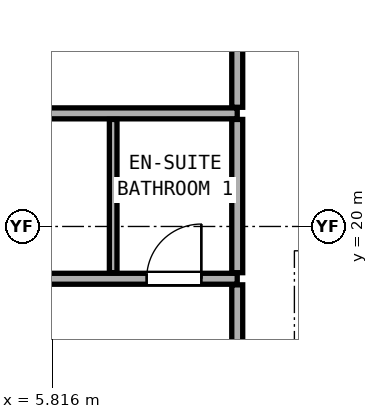
"""IFC4 building model, lengths in metres.
Left out: names, types, materials, properties, quantities, classifications, styles, units other than length and angle.
Written with IfcOpenShell. Run it as: python <this file> out.ifc"""

import sys

from ifc_helpers import new_model, si_unit, direction, frame, frame_2d, origin, place, context, subcontext, project, spatial, rectangle, extrude, element, fill, save


model = new_model("IFC4")
c1 = context("Model", 3, precision=1e-05, world=origin(), true_north=direction((0.0, 1.0)))
c2 = subcontext(c1, "Body", "Model", "MODEL_VIEW")
j1 = project(units=[si_unit("LENGTHUNIT", "METRE"), si_unit("PLANEANGLEUNIT", "RADIAN")], contexts=[c1])
p1 = place(None, origin())
s1 = spatial("IfcSite", under=j1, at=p1, CompositionType="ELEMENT")
p2 = place(p1, origin())
s2 = spatial("IfcBuilding", under=s1, at=p2, CompositionType="ELEMENT")
p3 = place(p2, frame((0.0, 0.0, 48.8)))
s3 = spatial("IfcBuildingStorey", under=s2, at=p3, CompositionType="ELEMENT", Elevation=48.8)
p4 = place(p3, frame((-2.72, 19.14, 0.0), z_axis=(0.0, 0.0, 1.0), x_axis=(1.0, 0.0, 0.0)))
e1 = element("IfcWall", 1, at=p4, inside=s3, PredefinedType="PARTITIONING", context=c2, shape_type="SweptSolid", body=[
    extrude(rectangle(XDim=11.58, YDim=0.18, at=frame_2d((5.79, 0.0))), origin(), (0.0, 0.0, 1.0), 2.125),
])
p5 = place(p4, frame((3.015, 0.0, 0.0)))
e2 = element("IfcOpeningElement", 2, at=p5, cuts=e1, PredefinedType="OPENING", context=c2, shape_type="SweptSolid", body=[
    extrude(rectangle(XDim=0.85, YDim=2.01, at=frame_2d((0.425, 1.005))), frame((0.0, 0.1, 0.0), z_axis=(0.0, -1.0, 0.0), x_axis=(1.0, 0.0, 0.0)), (0.0, 0.0, 1.0), 0.2),
])
p6 = place(p4, frame((10.09, 0.0, 0.0)))
e3 = element("IfcOpeningElement", 3, at=p6, cuts=e1, PredefinedType="OPENING", context=c2, shape_type="SweptSolid", body=[
    extrude(rectangle(XDim=0.9, YDim=2.1, at=frame_2d((0.45, 1.05))), frame((0.0, 0.1, 0.0), z_axis=(0.0, -1.0, 0.0), x_axis=(1.0, 0.0, 0.0)), (0.0, 0.0, 1.0), 0.2),
])
p7 = place(p3, frame((-2.72, 21.86, 0.0), z_axis=(0.0, 0.0, 1.0), x_axis=(1.0, 0.0, 0.0)))
e4 = element("IfcWall", 4, at=p7, inside=s3, PredefinedType="PARTITIONING", context=c2, shape_type="SweptSolid", body=[
    extrude(rectangle(XDim=11.58, YDim=0.18, at=frame_2d((5.79, 0.0))), origin(), (0.0, 0.0, 1.0), 2.125),
])
p8 = place(p3, frame((6.82, 19.24, 0.0), z_axis=(0.0, 0.0, 1.0), x_axis=(0.0, 1.0, 0.0)))
e5 = element("IfcWall", 5, at=p8, inside=s3, PredefinedType="PARTITIONING", context=c2, shape_type="SweptSolid", body=[
    extrude(rectangle(XDim=2.52, YDim=0.125, at=frame_2d((1.26, 0.0))), origin(), (0.0, 0.0, 1.0), 3.06),
])
p9 = place(p3, frame((8.86, 13.716, 0.0), z_axis=(0.0, 0.0, 1.0), x_axis=(0.0, 1.0, 0.0)))
e6 = element("IfcWall", 6, at=p9, inside=s3, PredefinedType="PARTITIONING", context=c2, shape_type="SweptSolid", body=[
    extrude(rectangle(XDim=5.324, YDim=0.18, at=frame_2d((2.662, 0.0))), origin(), (0.0, 0.0, 1.0), 2.436),
])
p10 = place(p9, frame((3.087, 0.0, 0.0)))
e7 = element("IfcOpeningElement", 7, at=p10, cuts=e6, PredefinedType="OPENING", context=c2, shape_type="SweptSolid", body=[
    extrude(rectangle(XDim=1.05, YDim=2.2, at=frame_2d((0.525, 1.1))), frame((0.0, 0.1, 0.0), z_axis=(0.0, -1.0, 0.0), x_axis=(1.0, 0.0, 0.0)), (0.0, 0.0, 1.0), 0.2),
])
p11 = place(p3, frame((8.86, 19.24, 0.0), z_axis=(0.0, 0.0, 1.0), x_axis=(0.0, 1.0, 0.0)))
e8 = element("IfcWall", 8, at=p11, inside=s3, PredefinedType="PARTITIONING", context=c2, shape_type="SweptSolid", body=[
    extrude(rectangle(XDim=2.52, YDim=0.18, at=frame_2d((1.26, 0.0))), origin(), (0.0, 0.0, 1.0), 3.06),
])
p12 = place(p3, frame((8.86, 21.96, 0.0), z_axis=(0.0, 0.0, 1.0), x_axis=(0.0, 1.0, 0.0)))
e9 = element("IfcWall", 9, at=p12, inside=s3, PredefinedType="PARTITIONING", context=c2, shape_type="SweptSolid", body=[
    extrude(rectangle(XDim=3.28, YDim=0.18, at=frame_2d((1.64, 0.0))), origin(), (0.0, 0.0, 1.0), 2.279),
])
p13 = place(p12, frame((1.115, 0.0, 0.0)))
e10 = element("IfcOpeningElement", 10, at=p13, cuts=e9, PredefinedType="OPENING", context=c2, shape_type="SweptSolid", body=[
    extrude(rectangle(XDim=1.05, YDim=2.2, at=frame_2d((0.525, 1.1))), frame((0.0, 0.1, 0.0), z_axis=(0.0, -1.0, 0.0), x_axis=(1.0, 0.0, 0.0)), (0.0, 0.0, 1.0), 0.2),
])
p14 = place(p6, origin())
e11 = element("IfcDoor", 11, at=p14, inside=s3, OperationType="SINGLE_SWING_RIGHT", PredefinedType="DOOR", context=c2, shape_type="SweptSolid", body=[
    extrude(rectangle(XDim=0.9, YDim=2.1, at=frame_2d((0.45, 1.05))), frame((0.0, 0.025, 0.0), z_axis=(0.0, -1.0, 0.0), x_axis=(1.0, 0.0, 0.0)), (0.0, 0.0, 1.0), 0.05),
])
fill(e3, e11)
save(model, sys.argv[1])
